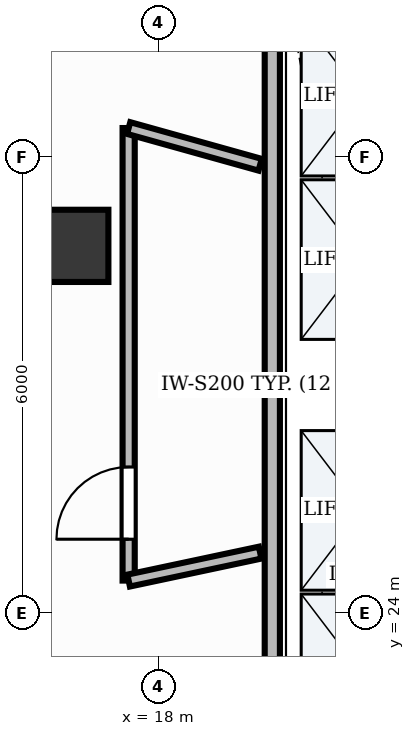
"""IFC4 building model, lengths in metres.
Left out: names, types, materials, properties, quantities, classifications, styles, units other than length and angle.
Written with IfcOpenShell. Run it as: python <this file> out.ifc"""

import sys

from ifc_helpers import new_model, si_unit, direction, frame, frame_2d, origin, origin_2d, place, context, subcontext, project, spatial, rectangle, extrude, element, fill, save


model = new_model("IFC4")
c1 = context("Model", 3, precision=1e-05, world=origin(), true_north=direction((0.0, 1.0)))
c2 = subcontext(c1, "Body", "Model", "MODEL_VIEW")
j1 = project(units=[si_unit("LENGTHUNIT", "METRE"), si_unit("PLANEANGLEUNIT", "RADIAN")], contexts=[c1])
p1 = place(None, origin())
s1 = spatial("IfcSite", under=j1, at=p1, CompositionType="ELEMENT")
p2 = place(p1, origin())
s2 = spatial("IfcBuilding", under=s1, at=p2, CompositionType="ELEMENT")
p3 = place(p2, frame((0.0, 0.0, 252.0)))
s3 = spatial("IfcBuildingStorey", under=s2, at=p3, CompositionType="ELEMENT", Elevation=252.0)
p4 = place(p3, frame((16.868, 28.83, -0.0), z_axis=(0.0, 0.0, 1.0), x_axis=(1.0, 0.0, 0.0)))
e1 = element("IfcColumn", 1, at=p4, inside=s3, PredefinedType="COLUMN", context=c2, shape_type="SweptSolid", body=[
    extrude(rectangle(XDim=0.95, YDim=0.95, at=origin_2d()), origin(), (0.0, 0.0, 1.0), 3.901),
])
p5 = place(p3, frame((19.5, 21.6, 0.0), z_axis=(0.0, 0.0, 1.0), x_axis=(0.0, 1.0, 0.0)))
e2 = element("IfcWall", 2, at=p5, inside=s3, PredefinedType="PARTITIONING", context=c2, shape_type="SweptSolid", body=[
    extrude(rectangle(XDim=10.8, YDim=0.2, at=frame_2d((5.4, 0.0))), origin(), (0.0, 0.0, 1.0), 2.91),
])
p6 = place(p3, frame((17.61, 24.427, 0.0), z_axis=(0.0, 0.0, 1.0), x_axis=(0.0, 1.0, 0.0)))
e3 = element("IfcWall", 3, at=p6, inside=s3, PredefinedType="PARTITIONING", context=c2, shape_type="SweptSolid", body=[
    extrude(rectangle(XDim=5.954, YDim=0.16, at=frame_2d((2.977, 0.0))), origin(), (0.0, 0.0, 1.0), 2.91),
])
p7 = place(p6, frame((0.544, 0.0, 0.0)))
e4 = element("IfcOpeningElement", 4, at=p7, cuts=e3, PredefinedType="OPENING", context=c2, shape_type="SweptSolid", body=[
    extrude(rectangle(XDim=0.95, YDim=2.15, at=frame_2d((0.475, 1.075))), frame((0.0, 0.095, 0.0), z_axis=(0.0, -1.0, 0.0), x_axis=(1.0, 0.0, 0.0)), (0.0, 0.0, 1.0), 0.19),
])
p8 = place(p3, frame((19.34, 24.795, 0.0), z_axis=(0.0, 0.0, 1.0), x_axis=(-0.978152535578, -0.207888472845, 0.0)))
e5 = element("IfcWall", 5, at=p8, inside=s3, PredefinedType="PARTITIONING", context=c2, shape_type="SweptSolid", body=[
    extrude(rectangle(XDim=1.769, YDim=0.16, at=frame_2d((0.884, 0.0))), origin(), (0.0, 0.0, 1.0), 2.91),
])
p9 = place(p3, frame((17.61, 30.381, 0.0), z_axis=(0.0, 0.0, 1.0), x_axis=(0.963143086718, -0.268989580668, 0.0)))
e6 = element("IfcWall", 6, at=p9, inside=s3, PredefinedType="PARTITIONING", context=c2, shape_type="SweptSolid", body=[
    extrude(rectangle(XDim=1.796, YDim=0.16, at=frame_2d((0.898, 0.0))), origin(), (0.0, 0.0, 1.0), 2.91),
])
p10 = place(p7, origin())
e7 = element("IfcDoor", 7, at=p10, inside=s3, OperationType="SINGLE_SWING_LEFT", PredefinedType="DOOR", context=c2, shape_type="SweptSolid", body=[
    extrude(rectangle(XDim=0.95, YDim=2.15, at=frame_2d((0.475, 1.075))), frame((0.0, 0.025, 0.0), z_axis=(0.0, -1.0, 0.0), x_axis=(1.0, 0.0, 0.0)), (0.0, 0.0, 1.0), 0.05),
])
fill(e4, e7)
save(model, sys.argv[1])
